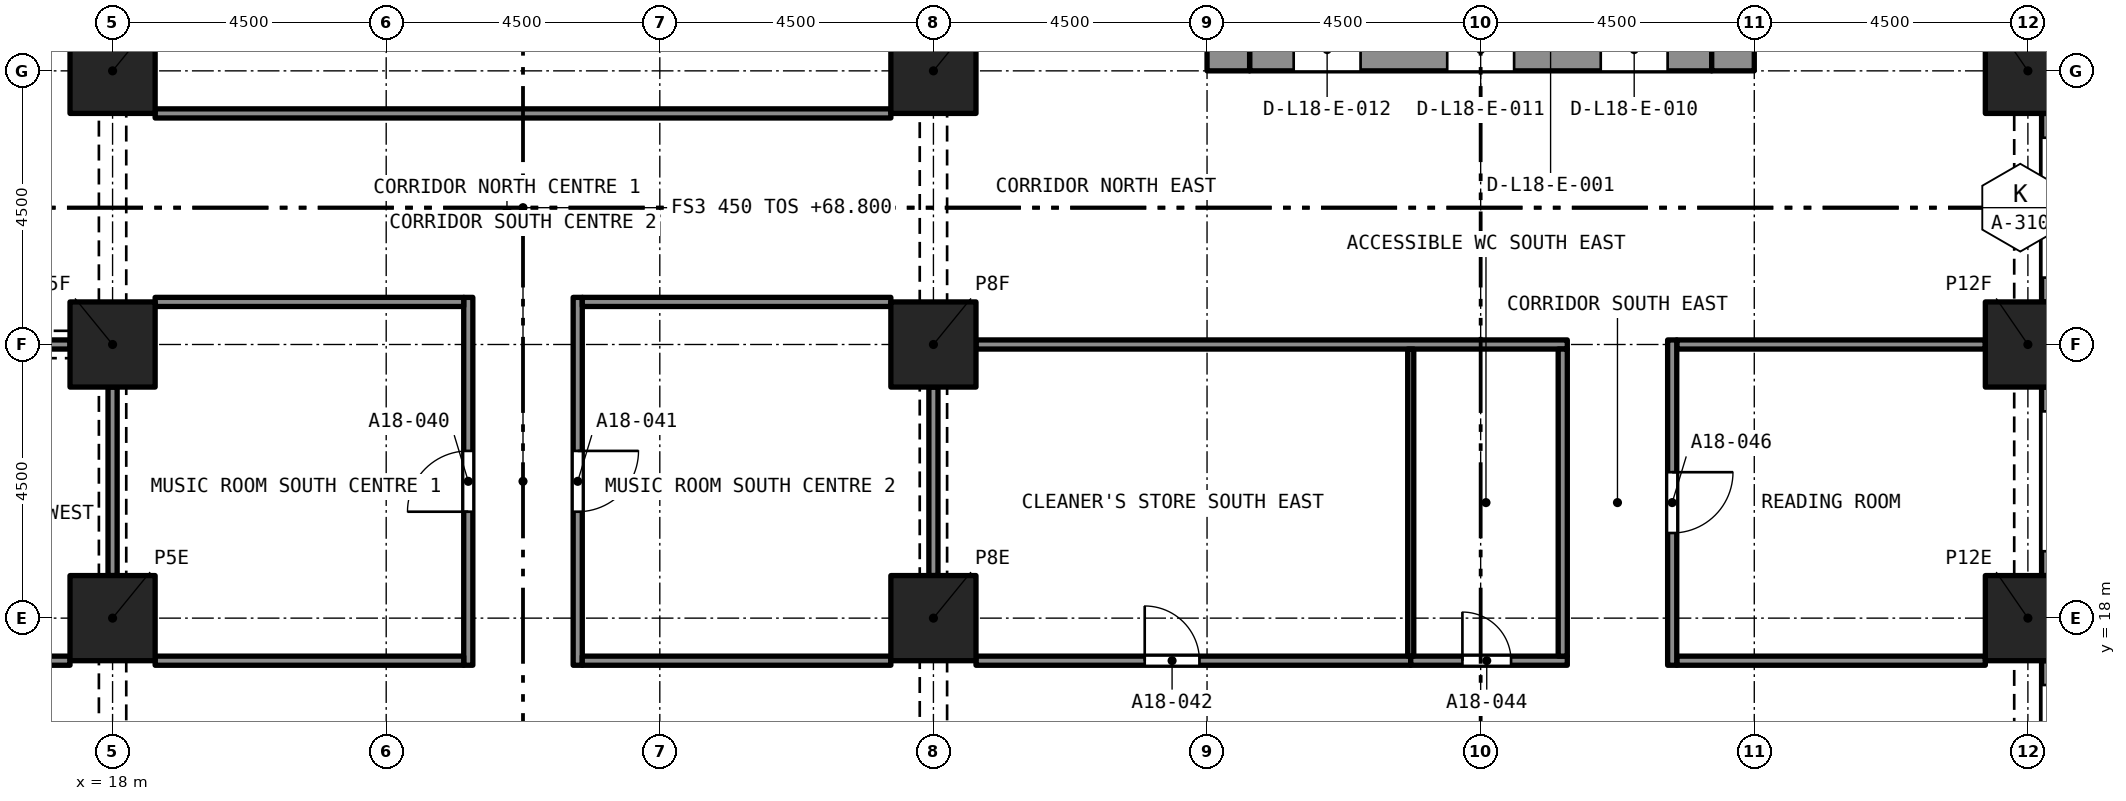
"""IFC4 building model, lengths in metres.
Left out: names, types, materials, properties, quantities, classifications, styles, units other than length and angle.
Written with IfcOpenShell. Run it as: python <this file> out.ifc"""

import sys

from ifc_helpers import new_model, si_unit, direction, frame, frame_2d, origin, origin_2d, place, context, subcontext, project, spatial, rectangle, extrude, element, fill, save


model = new_model("IFC4")
c1 = context("Model", 3, precision=1e-05, world=origin(), true_north=direction((0.0, 1.0)))
c2 = subcontext(c1, "Body", "Model", "MODEL_VIEW")
j1 = project(units=[si_unit("LENGTHUNIT", "METRE"), si_unit("PLANEANGLEUNIT", "RADIAN")], contexts=[c1])
p1 = place(None, origin())
s1 = spatial("IfcSite", under=j1, at=p1, CompositionType="ELEMENT")
p2 = place(p1, origin())
s2 = spatial("IfcBuilding", under=s1, at=p2, CompositionType="ELEMENT")
p3 = place(p2, frame((0.0, 0.0, 68.8)))
s3 = spatial("IfcBuildingStorey", under=s2, at=p3, CompositionType="ELEMENT", Elevation=68.8)
for number, where, z_axis, x_axis in (
    (1, (18.0, 18.0, 0.0), (0.0, 0.0, 1.0), (1.0, 0.0, 0.0)),
    (2, (31.5, 18.0, 0.0), (0.0, 0.0, 1.0), (1.0, 0.0, 0.0)),
    (3, (49.5, 18.0, 0.0), (0.0, 0.0, 1.0), (1.0, 0.0, 0.0)),
    (4, (18.0, 22.5, 0.0), (0.0, 0.0, 1.0), (1.0, 0.0, 0.0)),
    (5, (31.5, 22.5, 0.0), (0.0, 0.0, 1.0), (1.0, 0.0, 0.0)),
    (6, (49.5, 22.5, 0.0), (0.0, 0.0, 1.0), (1.0, 0.0, 0.0)),
    (7, (18.0, 27.0, 0.0), (0.0, 0.0, 1.0), (1.0, 0.0, 0.0)),
    (8, (31.5, 27.0, 0.0), (0.0, 0.0, 1.0), (1.0, 0.0, 0.0)),
    (9, (49.5, 27.0, 0.0), (0.0, 0.0, 1.0), (1.0, 0.0, 0.0)),
):
    element("IfcColumn", number, at=place(p3, frame(where, z_axis=z_axis, x_axis=x_axis)), inside=s3, PredefinedType="COLUMN", context=c2, shape_type="SweptSolid", body=[
        extrude(rectangle(XDim=1.4, YDim=1.4, at=origin_2d()), origin(), (0.0, 0.0, 1.0), 3.2),
    ])
p4 = place(p3, frame((36.7, 27.35, 0.0), z_axis=(0.0, 0.0, 1.0), x_axis=(1.0, 0.0, 0.0)))
e10 = element("IfcWall", 10, at=p4, inside=s3, PredefinedType="SOLIDWALL", context=c2, shape_type="SweptSolid", body=[
    extrude(rectangle(XDim=7.6, YDim=0.7, at=frame_2d((3.8, 0.0))), origin(), (0.0, 0.0, 1.0), 3.2),
])
p5 = place(p4, frame((5.775, 0.0, 0.0)))
e11 = element("IfcOpeningElement", 11, at=p5, cuts=e10, PredefinedType="OPENING", context=c2, shape_type="SweptSolid", body=[
    extrude(rectangle(XDim=1.1, YDim=2.1, at=frame_2d((0.55, 1.05))), frame((0.0, 0.36, 0.0), z_axis=(0.0, -1.0, 0.0), x_axis=(1.0, 0.0, 0.0)), (0.0, 0.0, 1.0), 0.72),
])
p6 = place(p4, frame((3.25, 0.0, 0.0)))
e12 = element("IfcOpeningElement", 12, at=p6, cuts=e10, PredefinedType="OPENING", context=c2, shape_type="SweptSolid", body=[
    extrude(rectangle(XDim=1.1, YDim=2.1, at=frame_2d((0.55, 1.05))), frame((0.0, 0.36, 0.0), z_axis=(0.0, -1.0, 0.0), x_axis=(1.0, 0.0, 0.0)), (0.0, 0.0, 1.0), 0.72),
])
p7 = place(p4, frame((0.725, 0.0, 0.0)))
e13 = element("IfcOpeningElement", 13, at=p7, cuts=e10, PredefinedType="OPENING", context=c2, shape_type="SweptSolid", body=[
    extrude(rectangle(XDim=1.1, YDim=2.1, at=frame_2d((0.55, 1.05))), frame((0.0, 0.36, 0.0), z_axis=(0.0, -1.0, 0.0), x_axis=(1.0, 0.0, 0.0)), (0.0, 0.0, 1.0), 0.72),
])
p8 = place(p3, frame((36.35, 27.0, 0.0), z_axis=(0.0, 0.0, 1.0), x_axis=(0.0, 1.0, 0.0)))
e14 = element("IfcWall", 14, at=p8, inside=s3, PredefinedType="SOLIDWALL", context=c2, shape_type="SweptSolid", body=[
    extrude(rectangle(XDim=13.5, YDim=0.7, at=frame_2d((6.75, 0.0))), origin(), (0.0, 0.0, 1.0), 3.2),
])
p9 = place(p8, frame((8.95, 0.0, 0.0)))
e15 = element("IfcOpeningElement", 15, at=p9, cuts=e14, PredefinedType="OPENING", context=c2, shape_type="SweptSolid", body=[
    extrude(rectangle(XDim=1.2, YDim=2.1, at=frame_2d((0.6, 1.05))), frame((0.0, 0.36, 0.0), z_axis=(0.0, -1.0, 0.0), x_axis=(1.0, 0.0, 0.0)), (0.0, 0.0, 1.0), 0.72),
])
p10 = place(p3, frame((44.65, 27.0, 0.0), z_axis=(0.0, 0.0, 1.0), x_axis=(0.0, 1.0, 0.0)))
e16 = element("IfcWall", 16, at=p10, inside=s3, PredefinedType="SOLIDWALL", context=c2, shape_type="SweptSolid", body=[
    extrude(rectangle(XDim=13.5, YDim=0.7, at=frame_2d((6.75, 0.0))), origin(), (0.0, 0.0, 1.0), 3.2),
])
p11 = place(p10, frame((8.95, 0.0, 0.0)))
e17 = element("IfcOpeningElement", 17, at=p11, cuts=e16, PredefinedType="OPENING", context=c2, shape_type="SweptSolid", body=[
    extrude(rectangle(XDim=1.2, YDim=2.1, at=frame_2d((0.6, 1.05))), frame((0.0, 0.36, 0.0), z_axis=(0.0, -1.0, 0.0), x_axis=(1.0, 0.0, 0.0)), (0.0, 0.0, 1.0), 0.72),
])
p12 = place(p3, frame((49.875, 17.3, 0.0), z_axis=(0.0, 0.0, 1.0), x_axis=(0.0, -1.0, 0.0)))
e18 = element("IfcWall", 18, at=p12, inside=s3, PredefinedType="SOLIDWALL", context=c2, shape_type="SweptSolid", body=[
    extrude(rectangle(XDim=3.1, YDim=0.3, at=frame_2d((1.55, 0.0))), origin(), (0.0, 0.0, 1.0), 3.2),
])
p13 = place(p12, frame((0.4, 0.0, 0.45)))
e19 = element("IfcOpeningElement", 19, at=p13, cuts=e18, PredefinedType="OPENING", context=c2, shape_type="SweptSolid", body=[
    extrude(rectangle(XDim=2.3, YDim=1.95, at=frame_2d((1.15, 0.975))), frame((0.0, 0.16, 0.0), z_axis=(0.0, -1.0, 0.0), x_axis=(1.0, 0.0, 0.0)), (0.0, 0.0, 1.0), 0.32),
])
p14 = place(p3, frame((49.875, 21.8, 0.0), z_axis=(0.0, 0.0, 1.0), x_axis=(0.0, -1.0, 0.0)))
e20 = element("IfcWall", 20, at=p14, inside=s3, PredefinedType="SOLIDWALL", context=c2, shape_type="SweptSolid", body=[
    extrude(rectangle(XDim=3.1, YDim=0.3, at=frame_2d((1.55, 0.0))), origin(), (0.0, 0.0, 1.0), 3.2),
])
p15 = place(p14, frame((0.4, 0.0, 0.45)))
e21 = element("IfcOpeningElement", 21, at=p15, cuts=e20, PredefinedType="OPENING", context=c2, shape_type="SweptSolid", body=[
    extrude(rectangle(XDim=2.3, YDim=1.95, at=frame_2d((1.15, 0.975))), frame((0.0, 0.16, 0.0), z_axis=(0.0, -1.0, 0.0), x_axis=(1.0, 0.0, 0.0)), (0.0, 0.0, 1.0), 0.32),
])
p16 = place(p3, frame((49.875, 26.3, 0.0), z_axis=(0.0, 0.0, 1.0), x_axis=(0.0, -1.0, 0.0)))
e22 = element("IfcWall", 22, at=p16, inside=s3, PredefinedType="SOLIDWALL", context=c2, shape_type="SweptSolid", body=[
    extrude(rectangle(XDim=3.1, YDim=0.3, at=frame_2d((1.55, 0.0))), origin(), (0.0, 0.0, 1.0), 3.2),
])
p17 = place(p16, frame((0.4, 0.0, 0.45)))
e23 = element("IfcOpeningElement", 23, at=p17, cuts=e22, PredefinedType="OPENING", context=c2, shape_type="SweptSolid", body=[
    extrude(rectangle(XDim=2.3, YDim=1.95, at=frame_2d((1.15, 0.975))), frame((0.0, 0.16, 0.0), z_axis=(0.0, -1.0, 0.0), x_axis=(1.0, 0.0, 0.0)), (0.0, 0.0, 1.0), 0.32),
])
p18 = place(p3, frame((23.85, 17.225, 0.0), z_axis=(0.0, 0.0, 1.0), x_axis=(0.0, 1.0, 0.0)))
e24 = element("IfcWall", 24, at=p18, inside=s3, PredefinedType="PARTITIONING", context=c2, shape_type="SweptSolid", body=[
    extrude(rectangle(XDim=6.05, YDim=0.15, at=frame_2d((3.025, 0.0))), origin(), (0.0, 0.0, 1.0), 2.75),
])
p19 = place(p18, frame((2.525, 0.0, 0.0)))
e25 = element("IfcOpeningElement", 25, at=p19, cuts=e24, PredefinedType="OPENING", context=c2, shape_type="SweptSolid", body=[
    extrude(rectangle(XDim=1.0, YDim=2.1, at=frame_2d((0.5, 1.05))), frame((0.0, 0.085, 0.0), z_axis=(0.0, -1.0, 0.0), x_axis=(1.0, 0.0, 0.0)), (0.0, 0.0, 1.0), 0.17),
])
p20 = place(p3, frame((25.65, 23.275, 0.0), z_axis=(0.0, 0.0, 1.0), x_axis=(0.0, -1.0, 0.0)))
e26 = element("IfcWall", 26, at=p20, inside=s3, PredefinedType="PARTITIONING", context=c2, shape_type="SweptSolid", body=[
    extrude(rectangle(XDim=6.05, YDim=0.15, at=frame_2d((3.025, 0.0))), origin(), (0.0, 0.0, 1.0), 2.75),
])
p21 = place(p20, frame((2.525, 0.0, 0.0)))
e27 = element("IfcOpeningElement", 27, at=p21, cuts=e26, PredefinedType="OPENING", context=c2, shape_type="SweptSolid", body=[
    extrude(rectangle(XDim=1.0, YDim=2.1, at=frame_2d((0.5, 1.05))), frame((0.0, 0.085, 0.0), z_axis=(0.0, -1.0, 0.0), x_axis=(1.0, 0.0, 0.0)), (0.0, 0.0, 1.0), 0.17),
])
for number, where, z_axis, x_axis in (
    (28, (18.7, 17.3, 0.0), (0.0, 0.0, 1.0), (1.0, 0.0, 0.0)),
    (29, (25.725, 17.3, 0.0), (0.0, 0.0, 1.0), (1.0, 0.0, 0.0)),
):
    element("IfcWall", number, at=place(p3, frame(where, z_axis=z_axis, x_axis=x_axis)), inside=s3, PredefinedType="PARTITIONING", context=c2, shape_type="SweptSolid", body=[
        extrude(rectangle(XDim=5.075, YDim=0.15, at=frame_2d((2.538, 0.0))), origin(), (0.0, 0.0, 1.0), 2.75),
    ])
p22 = place(p3, frame((32.2, 17.3, 0.0), z_axis=(0.0, 0.0, 1.0), x_axis=(1.0, 0.0, 0.0)))
e30 = element("IfcWall", 30, at=p22, inside=s3, PredefinedType="PARTITIONING", context=c2, shape_type="SweptSolid", body=[
    extrude(rectangle(XDim=7.15, YDim=0.15, at=frame_2d((3.575, 0.0))), origin(), (0.0, 0.0, 1.0), 2.9),
])
p23 = place(p22, frame((2.775, 0.0, 0.0)))
e31 = element("IfcOpeningElement", 31, at=p23, cuts=e30, PredefinedType="OPENING", context=c2, shape_type="SweptSolid", body=[
    extrude(rectangle(XDim=0.9, YDim=2.1, at=frame_2d((0.45, 1.05))), frame((0.0, 0.085, 0.0), z_axis=(0.0, -1.0, 0.0), x_axis=(1.0, 0.0, 0.0)), (0.0, 0.0, 1.0), 0.17),
])
p24 = place(p3, frame((10.15, 17.3, 0.0), z_axis=(0.0, 0.0, 1.0), x_axis=(1.0, 0.0, 0.0)))
e32 = element("IfcWall", 32, at=p24, inside=s3, PredefinedType="PARTITIONING", context=c2, shape_type="SweptSolid", body=[
    extrude(rectangle(XDim=7.15, YDim=0.15, at=frame_2d((3.575, 0.0))), origin(), (0.0, 0.0, 1.0), 2.9),
])
p25 = place(p24, frame((3.475, 0.0, 0.0)))
e33 = element("IfcOpeningElement", 33, at=p25, cuts=e32, PredefinedType="OPENING", context=c2, shape_type="SweptSolid", body=[
    extrude(rectangle(XDim=0.9, YDim=2.1, at=frame_2d((0.45, 1.05))), frame((0.0, 0.085, 0.0), z_axis=(0.0, -1.0, 0.0), x_axis=(1.0, 0.0, 0.0)), (0.0, 0.0, 1.0), 0.17),
])
p26 = place(p3, frame((39.35, 17.3, 0.0), z_axis=(0.0, 0.0, 1.0), x_axis=(1.0, 0.0, 0.0)))
e34 = element("IfcWall", 34, at=p26, inside=s3, PredefinedType="PARTITIONING", context=c2, shape_type="SweptSolid", body=[
    extrude(rectangle(XDim=2.575, YDim=0.15, at=frame_2d((1.288, 0.0))), origin(), (0.0, 0.0, 1.0), 2.9),
])
p27 = place(p26, frame((0.85, 0.0, 0.0)))
e35 = element("IfcOpeningElement", 35, at=p27, cuts=e34, PredefinedType="OPENING", context=c2, shape_type="SweptSolid", body=[
    extrude(rectangle(XDim=0.8, YDim=2.1, at=frame_2d((0.4, 1.05))), frame((0.0, 0.085, 0.0), z_axis=(0.0, -1.0, 0.0), x_axis=(1.0, 0.0, 0.0)), (0.0, 0.0, 1.0), 0.17),
])
p28 = place(p3, frame((43.725, 17.3, 0.0), z_axis=(0.0, 0.0, 1.0), x_axis=(1.0, 0.0, 0.0)))
e36 = element("IfcWall", 36, at=p28, inside=s3, PredefinedType="PARTITIONING", context=c2, shape_type="SweptSolid", body=[
    extrude(rectangle(XDim=5.075, YDim=0.15, at=frame_2d((2.538, 0.0))), origin(), (0.0, 0.0, 1.0), 2.9),
])
p29 = place(p3, frame((18.7, 26.3, 0.0), z_axis=(0.0, 0.0, 1.0), x_axis=(1.0, 0.0, 0.0)))
e37 = element("IfcWall", 37, at=p29, inside=s3, PredefinedType="PARTITIONING", context=c2, shape_type="SweptSolid", body=[
    extrude(rectangle(XDim=12.1, YDim=0.15, at=frame_2d((6.05, 0.0))), origin(), (0.0, 0.0, 1.0), 2.75),
])
p30 = place(p3, frame((18.7, 23.2, 0.0), z_axis=(0.0, 0.0, 1.0), x_axis=(1.0, 0.0, 0.0)))
e38 = element("IfcWall", 38, at=p30, inside=s3, PredefinedType="PARTITIONING", context=c2, shape_type="SweptSolid", body=[
    extrude(rectangle(XDim=5.075, YDim=0.15, at=frame_2d((2.538, 0.0))), origin(), (0.0, 0.0, 1.0), 2.75),
])
p31 = place(p3, frame((18.0, 18.7, 0.0), z_axis=(0.0, 0.0, 1.0), x_axis=(0.0, 1.0, 0.0)))
e39 = element("IfcWall", 39, at=p31, inside=s3, PredefinedType="PARTITIONING", context=c2, shape_type="SweptSolid", body=[
    extrude(rectangle(XDim=3.1, YDim=0.15, at=frame_2d((1.55, 0.0))), origin(), (0.0, 0.0, 1.0), 2.38),
])
p32 = place(p3, frame((25.725, 23.2, 0.0), z_axis=(0.0, 0.0, 1.0), x_axis=(1.0, 0.0, 0.0)))
e40 = element("IfcWall", 40, at=p32, inside=s3, PredefinedType="PARTITIONING", context=c2, shape_type="SweptSolid", body=[
    extrude(rectangle(XDim=5.075, YDim=0.15, at=frame_2d((2.538, 0.0))), origin(), (0.0, 0.0, 1.0), 2.75),
])
p33 = place(p3, frame((31.5, 18.7, 0.0), z_axis=(0.0, 0.0, 1.0), x_axis=(0.0, 1.0, 0.0)))
e41 = element("IfcWall", 41, at=p33, inside=s3, PredefinedType="PARTITIONING", context=c2, shape_type="SweptSolid", body=[
    extrude(rectangle(XDim=3.1, YDim=0.15, at=frame_2d((1.55, 0.0))), origin(), (0.0, 0.0, 1.0), 2.38),
])
p34 = place(p3, frame((32.2, 22.5, 0.0), z_axis=(0.0, 0.0, 1.0), x_axis=(1.0, 0.0, 0.0)))
e42 = element("IfcWall", 42, at=p34, inside=s3, PredefinedType="PARTITIONING", context=c2, shape_type="SweptSolid", body=[
    extrude(rectangle(XDim=9.725, YDim=0.15, at=frame_2d((4.863, 0.0))), origin(), (0.0, 0.0, 1.0), 2.9),
])
p35 = place(p3, frame((43.725, 22.5, 0.0), z_axis=(0.0, 0.0, 1.0), x_axis=(1.0, 0.0, 0.0)))
e43 = element("IfcWall", 43, at=p35, inside=s3, PredefinedType="PARTITIONING", context=c2, shape_type="SweptSolid", body=[
    extrude(rectangle(XDim=5.075, YDim=0.15, at=frame_2d((2.538, 0.0))), origin(), (0.0, 0.0, 1.0), 2.9),
])
p36 = place(p3, frame((14.2, 22.5, 0.0), z_axis=(0.0, 0.0, 1.0), x_axis=(1.0, 0.0, 0.0)))
e44 = element("IfcWall", 44, at=p36, inside=s3, PredefinedType="PARTITIONING", context=c2, shape_type="SweptSolid", body=[
    extrude(rectangle(XDim=3.1, YDim=0.15, at=frame_2d((1.55, 0.0))), origin(), (0.0, 0.0, 1.0), 2.38),
])
p37 = place(p3, frame((41.85, 17.375, 0.0), z_axis=(0.0, 0.0, 1.0), x_axis=(0.0, 1.0, 0.0)))
e45 = element("IfcWall", 45, at=p37, inside=s3, PredefinedType="PARTITIONING", context=c2, shape_type="SweptSolid", body=[
    extrude(rectangle(XDim=5.05, YDim=0.15, at=frame_2d((2.525, 0.0))), origin(), (0.0, 0.0, 1.0), 2.9),
])
p38 = place(p3, frame((43.65, 22.575, 0.0), z_axis=(0.0, 0.0, 1.0), x_axis=(0.0, -1.0, 0.0)))
e46 = element("IfcWall", 46, at=p38, inside=s3, PredefinedType="PARTITIONING", context=c2, shape_type="SweptSolid", body=[
    extrude(rectangle(XDim=5.35, YDim=0.15, at=frame_2d((2.675, 0.0))), origin(), (0.0, 0.0, 1.0), 2.9),
])
p39 = place(p38, frame((2.175, 0.0, 0.0)))
e47 = element("IfcOpeningElement", 47, at=p39, cuts=e46, PredefinedType="OPENING", context=c2, shape_type="SweptSolid", body=[
    extrude(rectangle(XDim=1.0, YDim=2.1, at=frame_2d((0.5, 1.05))), frame((0.0, 0.085, 0.0), z_axis=(0.0, -1.0, 0.0), x_axis=(1.0, 0.0, 0.0)), (0.0, 0.0, 1.0), 0.17),
])
p40 = place(p3, frame((39.35, 17.375, 0.0), z_axis=(0.0, 0.0, 1.0), x_axis=(0.0, 1.0, 0.0)))
e48 = element("IfcWall", 48, at=p40, inside=s3, PredefinedType="PARTITIONING", context=c2, shape_type="SweptSolid", body=[
    extrude(rectangle(XDim=5.05, YDim=0.1, at=frame_2d((2.525, 0.0))), origin(), (0.0, 0.0, 1.0), 2.9),
])
p41 = place(p19, origin())
e49 = element("IfcDoor", 49, at=p41, inside=s3, OperationType="SINGLE_SWING_RIGHT", PredefinedType="DOOR", context=c2, shape_type="SweptSolid", body=[
    extrude(rectangle(XDim=1.0, YDim=2.1, at=frame_2d((0.5, 1.05))), frame((0.0, 0.025, 0.0), z_axis=(0.0, -1.0, 0.0), x_axis=(1.0, 0.0, 0.0)), (0.0, 0.0, 1.0), 0.05),
])
fill(e25, e49)
p42 = place(p21, origin())
e50 = element("IfcDoor", 50, at=p42, inside=s3, OperationType="SINGLE_SWING_RIGHT", PredefinedType="DOOR", context=c2, shape_type="SweptSolid", body=[
    extrude(rectangle(XDim=1.0, YDim=2.1, at=frame_2d((0.5, 1.05))), frame((0.0, 0.025, 0.0), z_axis=(0.0, -1.0, 0.0), x_axis=(1.0, 0.0, 0.0)), (0.0, 0.0, 1.0), 0.05),
])
fill(e27, e50)
p43 = place(p23, origin())
e51 = element("IfcDoor", 51, at=p43, inside=s3, OperationType="SINGLE_SWING_LEFT", PredefinedType="DOOR", context=c2, shape_type="SweptSolid", body=[
    extrude(rectangle(XDim=0.9, YDim=2.1, at=frame_2d((0.45, 1.05))), frame((0.0, 0.025, 0.0), z_axis=(0.0, -1.0, 0.0), x_axis=(1.0, 0.0, 0.0)), (0.0, 0.0, 1.0), 0.05),
])
fill(e31, e51)
p44 = place(p27, origin())
e52 = element("IfcDoor", 52, at=p44, inside=s3, OperationType="SINGLE_SWING_LEFT", PredefinedType="DOOR", context=c2, shape_type="SweptSolid", body=[
    extrude(rectangle(XDim=0.8, YDim=2.1, at=frame_2d((0.4, 1.05))), frame((0.0, 0.025, 0.0), z_axis=(0.0, -1.0, 0.0), x_axis=(1.0, 0.0, 0.0)), (0.0, 0.0, 1.0), 0.05),
])
fill(e35, e52)
p45 = place(p39, origin())
e53 = element("IfcDoor", 53, at=p45, inside=s3, OperationType="SINGLE_SWING_RIGHT", PredefinedType="DOOR", context=c2, shape_type="SweptSolid", body=[
    extrude(rectangle(XDim=1.0, YDim=2.1, at=frame_2d((0.5, 1.05))), frame((0.0, 0.025, 0.0), z_axis=(0.0, -1.0, 0.0), x_axis=(1.0, 0.0, 0.0)), (0.0, 0.0, 1.0), 0.05),
])
fill(e47, e53)
save(model, sys.argv[1])
